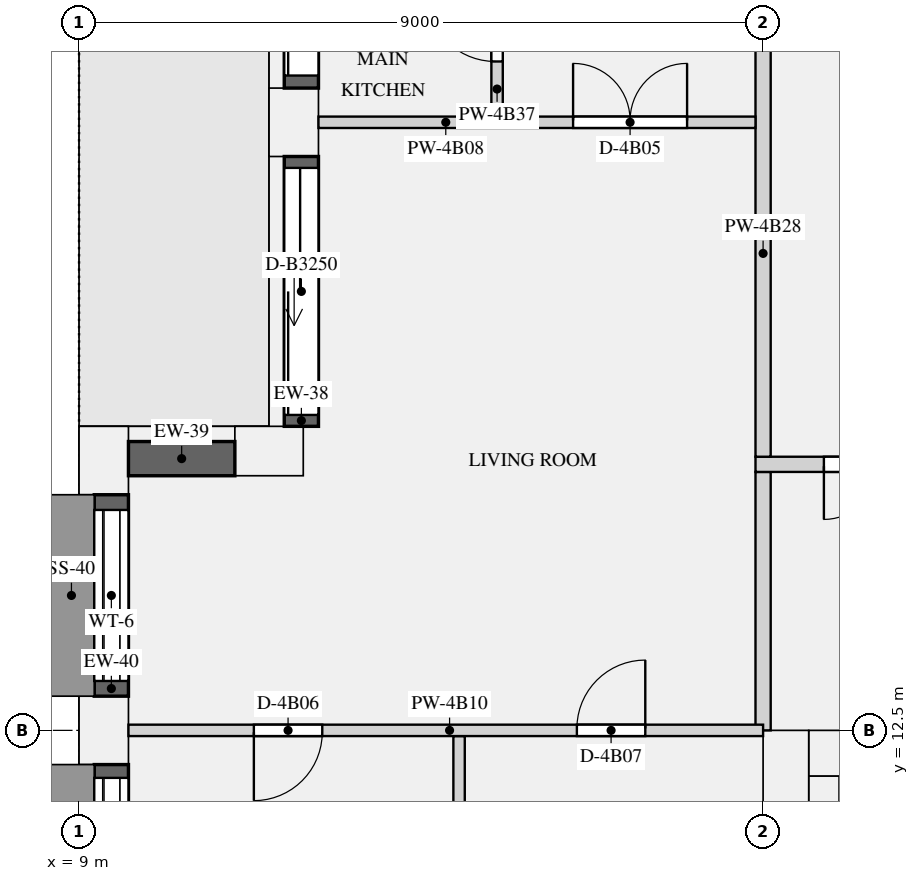
"""IFC4 building model, lengths in metres.
Left out: names, types, materials, properties, quantities, classifications, styles, units other than length and angle.
Written with IfcOpenShell. Run it as: python <this file> out.ifc"""

import sys

from ifc_helpers import new_model, si_unit, direction, frame, frame_2d, origin, origin_2d, place, context, subcontext, project, spatial, rectangle, extrude, element, fill, save


model = new_model("IFC4")
c1 = context("Model", 3, precision=1e-05, world=origin(), true_north=direction((0.0, 1.0)))
c2 = subcontext(c1, "Body", "Model", "MODEL_VIEW")
j1 = project(units=[si_unit("LENGTHUNIT", "METRE"), si_unit("PLANEANGLEUNIT", "RADIAN")], contexts=[c1])
p1 = place(None, origin())
s1 = spatial("IfcSite", under=j1, at=p1, CompositionType="ELEMENT")
p2 = place(p1, origin())
s2 = spatial("IfcBuilding", under=s1, at=p2, CompositionType="ELEMENT")
p3 = place(p2, frame((0.0, 0.0, 207.45)))
s3 = spatial("IfcBuildingStorey", under=s2, at=p3, CompositionType="ELEMENT", Elevation=207.45)
for number, where, z_axis, x_axis in (
    (1, (11.825, 20.5, 0.0), (0.0, 0.0, 1.0), (0.0, -1.0, 0.0)),
    (2, (11.5, 16.175, 0.0), (0.0, 0.0, 1.0), (-1.0, 0.0, 0.0)),
    (3, (9.325, 16.05, 0.0), (0.0, 0.0, 1.0), (0.0, -1.0, 0.0)),
    (4, (9.325, 12.5, 0.0), (0.0, 0.0, 1.0), (0.0, -1.0, 0.0)),
):
    element("IfcColumn", number, at=place(p3, frame(where, z_axis=z_axis, x_axis=x_axis)), inside=s3, PredefinedType="USERDEFINED", context=c2, shape_type="SweptSolid", body=[
        extrude(rectangle(XDim=0.9, YDim=0.65, at=origin_2d()), origin(), (0.0, 0.0, 1.0), 3.15),
    ])
p4 = place(p3, frame((18.3, 0.0, 0.0), z_axis=(0.0, 0.0, 1.0), x_axis=(0.0, 1.0, 0.0)))
e5 = element("IfcWall", 5, at=p4, inside=s3, PredefinedType="SHEAR", context=c2, shape_type="SweptSolid", body=[
    extrude(rectangle(XDim=12.5, YDim=0.6, at=frame_2d((6.25, 0.0))), origin(), (0.0, 0.0, 1.0), 3.15),
])
p5 = place(p3, frame((18.6, 12.2, 0.0), z_axis=(0.0, 0.0, 1.0), x_axis=(1.0, 0.0, 0.0)))
e6 = element("IfcWall", 6, at=p5, inside=s3, PredefinedType="SHEAR", context=c2, shape_type="SweptSolid", body=[
    extrude(rectangle(XDim=34.8, YDim=0.6, at=frame_2d((17.4, 0.0))), origin(), (0.0, 0.0, 1.0), 3.15),
])
p6 = place(p5, frame((24.575, 0.0, 0.0)))
e7 = element("IfcOpeningElement", 7, at=p6, cuts=e6, PredefinedType="OPENING", context=c2, shape_type="SweptSolid", body=[
    extrude(rectangle(XDim=1.1, YDim=2.1, at=frame_2d((0.55, 1.05))), frame((0.0, 0.31, 0.0), z_axis=(0.0, -1.0, 0.0), x_axis=(1.0, 0.0, 0.0)), (0.0, 0.0, 1.0), 0.62),
])
p7 = place(p5, frame((26.825, 0.0, 0.0)))
e8 = element("IfcOpeningElement", 8, at=p7, cuts=e6, PredefinedType="OPENING", context=c2, shape_type="SweptSolid", body=[
    extrude(rectangle(XDim=1.1, YDim=2.1, at=frame_2d((0.55, 1.05))), frame((0.0, 0.31, 0.0), z_axis=(0.0, -1.0, 0.0), x_axis=(1.0, 0.0, 0.0)), (0.0, 0.0, 1.0), 0.62),
])
p8 = place(p5, frame((29.075, 0.0, 0.0)))
e9 = element("IfcOpeningElement", 9, at=p8, cuts=e6, PredefinedType="OPENING", context=c2, shape_type="SweptSolid", body=[
    extrude(rectangle(XDim=1.1, YDim=2.1, at=frame_2d((0.55, 1.05))), frame((0.0, 0.31, 0.0), z_axis=(0.0, -1.0, 0.0), x_axis=(1.0, 0.0, 0.0)), (0.0, 0.0, 1.0), 0.62),
])
p9 = place(p5, frame((4.95, 0.0, 0.0)))
e10 = element("IfcOpeningElement", 10, at=p9, cuts=e6, PredefinedType="OPENING", context=c2, shape_type="SweptSolid", body=[
    extrude(rectangle(XDim=0.9, YDim=2.1, at=frame_2d((0.45, 1.05))), frame((0.0, 0.31, 0.0), z_axis=(0.0, -1.0, 0.0), x_axis=(1.0, 0.0, 0.0)), (0.0, 0.0, 1.0), 0.62),
])
p10 = place(p5, frame((13.95, 0.0, 0.0)))
e11 = element("IfcOpeningElement", 11, at=p10, cuts=e6, PredefinedType="OPENING", context=c2, shape_type="SweptSolid", body=[
    extrude(rectangle(XDim=0.9, YDim=2.1, at=frame_2d((0.45, 1.05))), frame((0.0, 0.31, 0.0), z_axis=(0.0, -1.0, 0.0), x_axis=(1.0, 0.0, 0.0)), (0.0, 0.0, 1.0), 0.62),
])
p11 = place(p5, frame((18.45, 0.0, 0.0)))
e12 = element("IfcOpeningElement", 12, at=p11, cuts=e6, PredefinedType="OPENING", context=c2, shape_type="SweptSolid", body=[
    extrude(rectangle(XDim=0.9, YDim=2.1, at=frame_2d((0.45, 1.05))), frame((0.0, 0.31, 0.0), z_axis=(0.0, -1.0, 0.0), x_axis=(1.0, 0.0, 0.0)), (0.0, 0.0, 1.0), 0.62),
])
p12 = place(p5, frame((1.55, 0.0, 0.0)))
e13 = element("IfcOpeningElement", 13, at=p12, cuts=e6, PredefinedType="OPENING", context=c2, shape_type="SweptSolid", body=[
    extrude(rectangle(XDim=1.2, YDim=2.1, at=frame_2d((0.6, 1.05))), frame((0.0, 0.31, 0.0), z_axis=(0.0, -1.0, 0.0), x_axis=(1.0, 0.0, 0.0)), (0.0, 0.0, 1.0), 0.62),
])
p13 = place(p5, frame((32.05, 0.0, 0.0)))
e14 = element("IfcOpeningElement", 14, at=p13, cuts=e6, PredefinedType="OPENING", context=c2, shape_type="SweptSolid", body=[
    extrude(rectangle(XDim=1.2, YDim=2.1, at=frame_2d((0.6, 1.05))), frame((0.0, 0.31, 0.0), z_axis=(0.0, -1.0, 0.0), x_axis=(1.0, 0.0, 0.0)), (0.0, 0.0, 1.0), 0.62),
])
p14 = place(p3, frame((18.8, 1.0, 0.0), z_axis=(0.0, 0.0, 1.0), x_axis=(0.0, 1.0, 0.0)))
e15 = element("IfcWall", 15, at=p14, inside=s3, PredefinedType="SHEAR", context=c2, shape_type="SweptSolid", body=[
    extrude(rectangle(XDim=10.9, YDim=0.4, at=frame_2d((5.45, 0.0))), origin(), (0.0, 0.0, 1.0), 3.15),
])
p15 = place(p3, frame((11.925, 24.05, 0.0), z_axis=(0.0, 0.0, 1.0), x_axis=(0.0, -1.0, 0.0)))
e16 = element("IfcWall", 16, at=p15, inside=s3, PredefinedType="SOLIDWALL", context=c2, shape_type="SweptSolid", body=[
    extrude(rectangle(XDim=3.1, YDim=0.45, at=frame_2d((1.55, 0.0))), origin(), (0.0, 0.0, 1.0), 2.83),
])
p16 = place(p15, frame((1.185, 0.0, 0.0)))
e17 = element("IfcOpeningElement", 17, at=p16, cuts=e16, PredefinedType="OPENING", context=c2, shape_type="SweptSolid", body=[
    extrude(rectangle(XDim=1.75, YDim=2.3, at=frame_2d((0.875, 1.15))), frame((0.0, 0.235, 0.0), z_axis=(0.0, -1.0, 0.0), x_axis=(1.0, 0.0, 0.0)), (0.0, 0.0, 1.0), 0.47),
])
p17 = place(p3, frame((11.925, 20.05, 0.0), z_axis=(0.0, 0.0, 1.0), x_axis=(0.0, -1.0, 0.0)))
e18 = element("IfcWall", 18, at=p17, inside=s3, PredefinedType="SOLIDWALL", context=c2, shape_type="SweptSolid", body=[
    extrude(rectangle(XDim=3.55, YDim=0.45, at=frame_2d((1.775, 0.0))), origin(), (0.0, 0.0, 1.0), 2.83),
])
p18 = place(p17, frame((0.15, 0.0, 0.0)))
e19 = element("IfcOpeningElement", 19, at=p18, cuts=e18, PredefinedType="OPENING", context=c2, shape_type="SweptSolid", body=[
    extrude(rectangle(XDim=3.25, YDim=2.3, at=frame_2d((1.625, 1.15))), frame((0.0, 0.235, 0.0), z_axis=(0.0, -1.0, 0.0), x_axis=(1.0, 0.0, 0.0)), (0.0, 0.0, 1.0), 0.47),
])
p19 = place(p3, frame((11.05, 16.075, 0.9), z_axis=(0.0, 0.0, 1.0), x_axis=(-1.0, 0.0, 0.0)))
e20 = element("IfcWall", 20, at=p19, inside=s3, PredefinedType="SOLIDWALL", context=c2, shape_type="SweptSolid", body=[
    extrude(rectangle(XDim=1.4, YDim=0.45, at=frame_2d((0.7, 0.0))), origin(), (0.0, 0.0, 1.0), 1.93),
])
p20 = place(p3, frame((9.425, 15.6, 0.9), z_axis=(0.0, 0.0, 1.0), x_axis=(0.0, -1.0, 0.0)))
e21 = element("IfcWall", 21, at=p20, inside=s3, PredefinedType="SOLIDWALL", context=c2, shape_type="SweptSolid", body=[
    extrude(rectangle(XDim=2.65, YDim=0.45, at=frame_2d((1.325, 0.0))), origin(), (0.0, 0.0, 1.0), 1.93),
])
p21 = place(p20, frame((0.2, 0.0, 0.15)))
e22 = element("IfcOpeningElement", 22, at=p21, cuts=e21, PredefinedType="OPENING", context=c2, shape_type="SweptSolid", body=[
    extrude(rectangle(XDim=2.25, YDim=1.5, at=frame_2d((1.125, 0.75))), frame((0.0, 0.235, 0.0), z_axis=(0.0, -1.0, 0.0), x_axis=(1.0, 0.0, 0.0)), (0.0, 0.0, 1.0), 0.47),
])
p22 = place(p3, frame((9.425, 12.05, 0.9), z_axis=(0.0, 0.0, 1.0), x_axis=(0.0, -1.0, 0.0)))
e23 = element("IfcWall", 23, at=p22, inside=s3, PredefinedType="SOLIDWALL", context=c2, shape_type="SweptSolid", body=[
    extrude(rectangle(XDim=3.1, YDim=0.45, at=frame_2d((1.55, 0.0))), origin(), (0.0, 0.0, 1.0), 1.93),
])
p23 = place(p22, frame((0.175, 0.0, 0.15)))
e24 = element("IfcOpeningElement", 24, at=p23, cuts=e23, PredefinedType="OPENING", context=c2, shape_type="SweptSolid", body=[
    extrude(rectangle(XDim=2.75, YDim=1.5, at=frame_2d((1.375, 0.75))), frame((0.0, 0.235, 0.0), z_axis=(0.0, -1.0, 0.0), x_axis=(1.0, 0.0, 0.0)), (0.0, 0.0, 1.0), 0.47),
])
p24 = place(p3, frame((18.0, 12.5, 0.0), z_axis=(0.0, 0.0, 1.0), x_axis=(0.0, 1.0, 0.0)))
e25 = element("IfcWall", 25, at=p24, inside=s3, PredefinedType="PARTITIONING", context=c2, shape_type="SweptSolid", body=[
    extrude(rectangle(XDim=3.4, YDim=0.2, at=frame_2d((1.7, 0.0))), origin(), (0.0, 0.0, 1.0), 2.83),
])
p25 = place(p3, frame((12.15, 20.5, 0.0), z_axis=(0.0, 0.0, 1.0), x_axis=(1.0, 0.0, 0.0)))
e26 = element("IfcWall", 26, at=p25, inside=s3, PredefinedType="PARTITIONING", context=c2, shape_type="SweptSolid", body=[
    extrude(rectangle(XDim=5.75, YDim=0.15, at=frame_2d((2.875, 0.0))), origin(), (0.0, 0.0, 1.0), 2.83),
])
p26 = place(p25, frame((3.35, 0.0, 0.0)))
e27 = element("IfcOpeningElement", 27, at=p26, cuts=e26, PredefinedType="OPENING", context=c2, shape_type="SweptSolid", body=[
    extrude(rectangle(XDim=1.5, YDim=2.1, at=frame_2d((0.75, 1.05))), frame((0.0, 0.085, 0.0), z_axis=(0.0, -1.0, 0.0), x_axis=(1.0, 0.0, 0.0)), (0.0, 0.0, 1.0), 0.17),
])
p27 = place(p3, frame((9.65, 12.5, 0.0), z_axis=(0.0, 0.0, 1.0), x_axis=(1.0, 0.0, 0.0)))
e28 = element("IfcWall", 28, at=p27, inside=s3, PredefinedType="PARTITIONING", context=c2, shape_type="SweptSolid", body=[
    extrude(rectangle(XDim=8.35, YDim=0.15, at=frame_2d((4.175, 0.0))), origin(), (0.0, 0.0, 1.0), 2.83),
])
p28 = place(p27, frame((1.65, 0.0, 0.0)))
e29 = element("IfcOpeningElement", 29, at=p28, cuts=e28, PredefinedType="OPENING", context=c2, shape_type="SweptSolid", body=[
    extrude(rectangle(XDim=0.9, YDim=2.1, at=frame_2d((0.45, 1.05))), frame((0.0, 0.085, 0.0), z_axis=(0.0, -1.0, 0.0), x_axis=(1.0, 0.0, 0.0)), (0.0, 0.0, 1.0), 0.17),
])
p29 = place(p27, frame((5.9, 0.0, 0.0)))
e30 = element("IfcOpeningElement", 30, at=p29, cuts=e28, PredefinedType="OPENING", context=c2, shape_type="SweptSolid", body=[
    extrude(rectangle(XDim=0.9, YDim=2.1, at=frame_2d((0.45, 1.05))), frame((0.0, 0.085, 0.0), z_axis=(0.0, -1.0, 0.0), x_axis=(1.0, 0.0, 0.0)), (0.0, 0.0, 1.0), 0.17),
])
p30 = place(p3, frame((17.9, 16.0, 0.0), z_axis=(0.0, 0.0, 1.0), x_axis=(1.0, 0.0, 0.0)))
e31 = element("IfcWall", 31, at=p30, inside=s3, PredefinedType="PARTITIONING", context=c2, shape_type="SweptSolid", body=[
    extrude(rectangle(XDim=36.2, YDim=0.2, at=frame_2d((18.1, 0.0))), origin(), (0.0, 0.0, 1.0), 2.83),
])
p31 = place(p30, frame((0.9, 0.0, 0.0)))
e32 = element("IfcOpeningElement", 32, at=p31, cuts=e31, PredefinedType="OPENING", context=c2, shape_type="SweptSolid", body=[
    extrude(rectangle(XDim=1.4, YDim=2.1, at=frame_2d((0.7, 1.05))), frame((0.0, 0.11, 0.0), z_axis=(0.0, -1.0, 0.0), x_axis=(1.0, 0.0, 0.0)), (0.0, 0.0, 1.0), 0.22),
])
p32 = place(p30, frame((33.9, 0.0, 0.0)))
e33 = element("IfcOpeningElement", 33, at=p32, cuts=e31, PredefinedType="OPENING", context=c2, shape_type="SweptSolid", body=[
    extrude(rectangle(XDim=1.4, YDim=2.1, at=frame_2d((0.7, 1.05))), frame((0.0, 0.11, 0.0), z_axis=(0.0, -1.0, 0.0), x_axis=(1.0, 0.0, 0.0)), (0.0, 0.0, 1.0), 0.22),
])
p33 = place(p3, frame((18.0, 16.1, 0.0), z_axis=(0.0, 0.0, 1.0), x_axis=(0.0, 1.0, 0.0)))
e34 = element("IfcWall", 34, at=p33, inside=s3, PredefinedType="PARTITIONING", context=c2, shape_type="SweptSolid", body=[
    extrude(rectangle(XDim=7.8, YDim=0.2, at=frame_2d((3.9, 0.0))), origin(), (0.0, 0.0, 1.0), 2.83),
])
p34 = place(p33, frame((5.35, 0.0, 0.0)))
e35 = element("IfcOpeningElement", 35, at=p34, cuts=e34, PredefinedType="OPENING", context=c2, shape_type="SweptSolid", body=[
    extrude(rectangle(XDim=1.1, YDim=2.1, at=frame_2d((0.55, 1.05))), frame((0.0, 0.11, 0.0), z_axis=(0.0, -1.0, 0.0), x_axis=(1.0, 0.0, 0.0)), (0.0, 0.0, 1.0), 0.22),
])
p35 = place(p3, frame((14.5, 20.575, 0.0), z_axis=(0.0, 0.0, 1.0), x_axis=(0.0, 1.0, 0.0)))
e36 = element("IfcWall", 36, at=p35, inside=s3, PredefinedType="PARTITIONING", context=c2, shape_type="SweptSolid", body=[
    extrude(rectangle(XDim=2.325, YDim=0.15, at=frame_2d((1.163, 0.0))), origin(), (0.0, 0.0, 1.0), 2.83),
])
p36 = place(p35, frame((0.725, 0.0, 0.0)))
e37 = element("IfcOpeningElement", 37, at=p36, cuts=e36, PredefinedType="OPENING", context=c2, shape_type="SweptSolid", body=[
    extrude(rectangle(XDim=0.9, YDim=2.1, at=frame_2d((0.45, 1.05))), frame((0.0, 0.085, 0.0), z_axis=(0.0, -1.0, 0.0), x_axis=(1.0, 0.0, 0.0)), (0.0, 0.0, 1.0), 0.17),
])
p37 = place(p3, frame((14.0, 8.575, 0.0), z_axis=(0.0, 0.0, 1.0), x_axis=(0.0, 1.0, 0.0)))
e38 = element("IfcWall", 38, at=p37, inside=s3, PredefinedType="PARTITIONING", context=c2, shape_type="SweptSolid", body=[
    extrude(rectangle(XDim=3.85, YDim=0.15, at=frame_2d((1.925, 0.0))), origin(), (0.0, 0.0, 1.0), 2.83),
])
p38 = place(p16, origin())
e39 = element("IfcDoor", 39, at=p38, inside=s3, OperationType="SLIDING_TO_LEFT", PredefinedType="DOOR", context=c2, shape_type="SweptSolid", body=[
    extrude(rectangle(XDim=1.75, YDim=2.3, at=frame_2d((0.875, 1.15))), frame((0.0, -0.07, 0.0), z_axis=(0.0, -1.0, 0.0), x_axis=(1.0, 0.0, 0.0)), (0.0, 0.0, 1.0), 0.05),
])
fill(e17, e39)
p39 = place(p18, origin())
e40 = element("IfcDoor", 40, at=p39, inside=s3, OperationType="SLIDING_TO_LEFT", PredefinedType="DOOR", context=c2, shape_type="SweptSolid", body=[
    extrude(rectangle(XDim=3.25, YDim=2.3, at=frame_2d((1.625, 1.15))), frame((0.0, -0.07, 0.0), z_axis=(0.0, -1.0, 0.0), x_axis=(1.0, 0.0, 0.0)), (0.0, 0.0, 1.0), 0.05),
])
fill(e19, e40)
p40 = place(p21, origin())
e41 = element("IfcWindow", 41, at=p40, inside=s3, PartitioningType="SINGLE_PANEL", PredefinedType="WINDOW", context=c2, shape_type="SweptSolid", body=[
    extrude(rectangle(XDim=2.25, YDim=1.5, at=frame_2d((1.125, 0.75))), frame((0.0, -0.065, 0.0), z_axis=(0.0, -1.0, 0.0), x_axis=(1.0, 0.0, 0.0)), (0.0, 0.0, 1.0), 0.06),
])
fill(e22, e41)
p41 = place(p23, origin())
e42 = element("IfcWindow", 42, at=p41, inside=s3, PartitioningType="SINGLE_PANEL", PredefinedType="WINDOW", context=c2, shape_type="SweptSolid", body=[
    extrude(rectangle(XDim=2.75, YDim=1.5, at=frame_2d((1.375, 0.75))), frame((0.0, -0.065, 0.0), z_axis=(0.0, -1.0, 0.0), x_axis=(1.0, 0.0, 0.0)), (0.0, 0.0, 1.0), 0.06),
])
fill(e24, e42)
p42 = place(p31, frame((1.4, 0.0, 0.0), z_axis=(0.0, 0.0, 1.0), x_axis=(-1.0, 0.0, 0.0)))
e43 = element("IfcDoor", 43, at=p42, inside=s3, OperationType="DOUBLE_DOOR_SINGLE_SWING", PredefinedType="DOOR", context=c2, shape_type="SweptSolid", body=[
    extrude(rectangle(XDim=1.4, YDim=2.1, at=frame_2d((0.7, 1.05))), frame((0.0, 0.025, 0.0), z_axis=(0.0, -1.0, 0.0), x_axis=(1.0, 0.0, 0.0)), (0.0, 0.0, 1.0), 0.05),
])
fill(e32, e43)
p43 = place(p36, origin())
e44 = element("IfcDoor", 44, at=p43, inside=s3, OperationType="SINGLE_SWING_RIGHT", PredefinedType="DOOR", context=c2, shape_type="SweptSolid", body=[
    extrude(rectangle(XDim=0.9, YDim=2.1, at=frame_2d((0.45, 1.05))), frame((0.0, 0.025, 0.0), z_axis=(0.0, -1.0, 0.0), x_axis=(1.0, 0.0, 0.0)), (0.0, 0.0, 1.0), 0.05),
])
fill(e37, e44)
p44 = place(p26, origin())
e45 = element("IfcDoor", 45, at=p44, inside=s3, OperationType="DOUBLE_DOOR_SINGLE_SWING", PredefinedType="DOOR", context=c2, shape_type="SweptSolid", body=[
    extrude(rectangle(XDim=1.5, YDim=2.1, at=frame_2d((0.75, 1.05))), frame((0.0, 0.025, 0.0), z_axis=(0.0, -1.0, 0.0), x_axis=(1.0, 0.0, 0.0)), (0.0, 0.0, 1.0), 0.05),
])
fill(e27, e45)
p45 = place(p28, frame((0.9, 0.0, 0.0), z_axis=(0.0, 0.0, 1.0), x_axis=(-1.0, 0.0, 0.0)))
e46 = element("IfcDoor", 46, at=p45, inside=s3, OperationType="SINGLE_SWING_RIGHT", PredefinedType="DOOR", context=c2, shape_type="SweptSolid", body=[
    extrude(rectangle(XDim=0.9, YDim=2.1, at=frame_2d((0.45, 1.05))), frame((0.0, 0.025, 0.0), z_axis=(0.0, -1.0, 0.0), x_axis=(1.0, 0.0, 0.0)), (0.0, 0.0, 1.0), 0.05),
])
fill(e29, e46)
p46 = place(p29, origin())
e47 = element("IfcDoor", 47, at=p46, inside=s3, OperationType="SINGLE_SWING_RIGHT", PredefinedType="DOOR", context=c2, shape_type="SweptSolid", body=[
    extrude(rectangle(XDim=0.9, YDim=2.1, at=frame_2d((0.45, 1.05))), frame((0.0, 0.025, 0.0), z_axis=(0.0, -1.0, 0.0), x_axis=(1.0, 0.0, 0.0)), (0.0, 0.0, 1.0), 0.05),
])
fill(e30, e47)
save(model, sys.argv[1])
